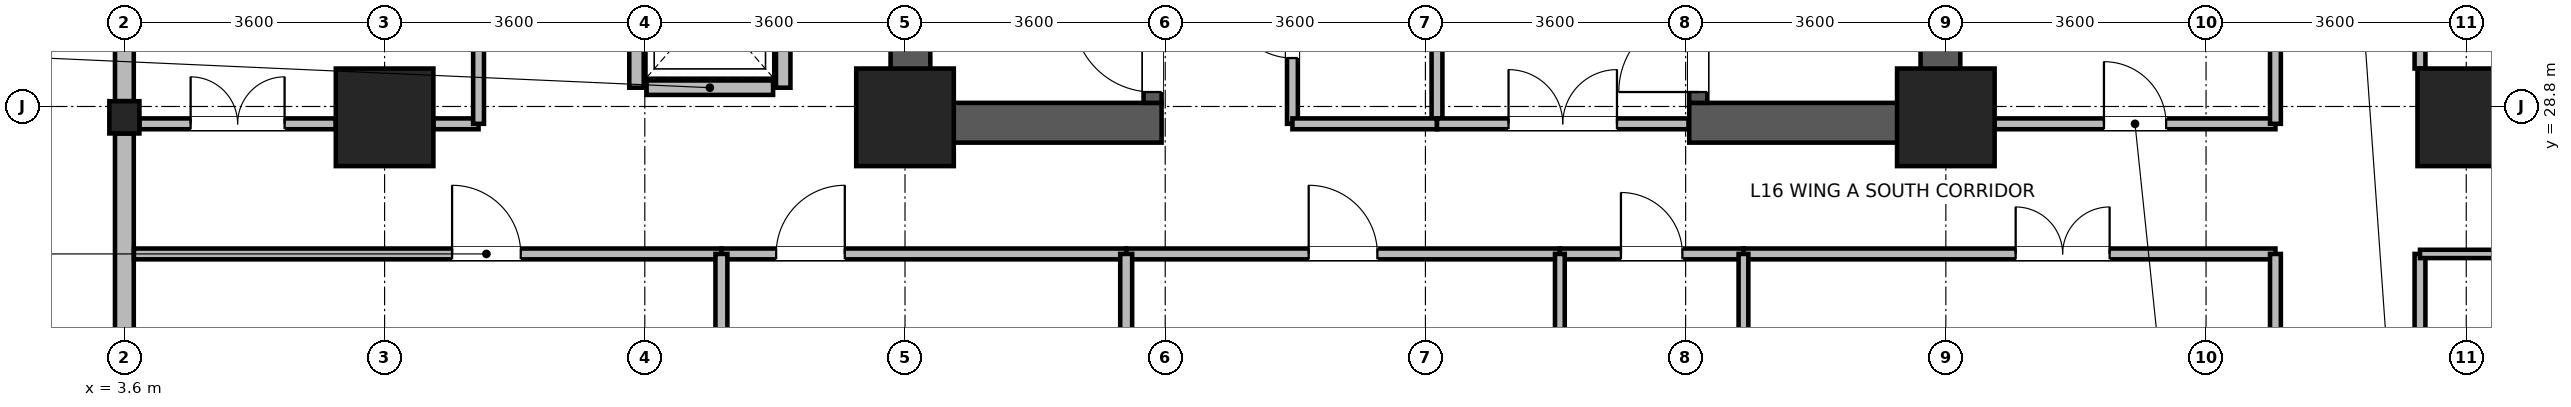
"""IFC4 building model, lengths in metres.
Left out: names, types, materials, properties, quantities, classifications, styles, units other than length and angle.
Written with IfcOpenShell. Run it as: python <this file> out.ifc"""

import sys

from ifc_helpers import new_model, si_unit, direction, frame, frame_2d, origin, origin_2d, place, context, subcontext, project, spatial, rectangle, i_section, extrude, source, transform, mapped, element, fill, save


model = new_model("IFC4")
c1 = context("Model", 3, precision=1e-05, world=origin(), true_north=direction((0.0, 1.0)))
c2 = subcontext(c1, "Body", "Model", "MODEL_VIEW")
j1 = project(units=[si_unit("LENGTHUNIT", "METRE"), si_unit("PLANEANGLEUNIT", "RADIAN")], contexts=[c1])
p1 = place(None, origin())
s1 = spatial("IfcSite", under=j1, at=p1, CompositionType="ELEMENT")
p2 = place(p1, origin())
s2 = spatial("IfcBuilding", under=s1, at=p2, CompositionType="ELEMENT")
p3 = place(p2, frame((0.0, 0.0, 66.0)))
s3 = spatial("IfcBuildingStorey", under=s2, at=p3, CompositionType="ELEMENT", Elevation=66.0)
for number, where, z_axis, x_axis in (
    (1, (14.475, 28.3, 0.0), (0.0, 0.0, 1.0), (0.0, 1.0, 0.0)),
    (2, (28.725, 28.3, 0.0), (0.0, 0.0, 1.0), (0.0, 1.0, 0.0)),
):
    element("IfcWall", number, at=place(p3, frame(where, z_axis=z_axis, x_axis=x_axis)), inside=s3, PredefinedType="SHEAR", context=c2, shape_type="SweptSolid", body=[
        extrude(rectangle(XDim=8.1, YDim=0.55, at=frame_2d((4.05, 0.0))), origin(), (0.0, 0.0, 1.0), 3.45),
    ])
for number, where, z_axis, x_axis in (
    (3, (14.75, 28.575, 0.0), (0.0, 0.0, 1.0), (1.0, 0.0, 0.0)),
    (4, (25.25, 28.575, 0.0), (0.0, 0.0, 1.0), (1.0, 0.0, 0.0)),
):
    element("IfcWall", number, at=place(p3, frame(where, z_axis=z_axis, x_axis=x_axis)), inside=s3, PredefinedType="SHEAR", context=c2, shape_type="SweptSolid", body=[
        extrude(rectangle(XDim=3.2, YDim=0.55, at=frame_2d((1.6, 0.0))), origin(), (0.0, 0.0, 1.0), 3.45),
    ])
p4 = place(p3, frame((17.825, 28.85, 0.0), z_axis=(0.0, 0.0, 1.0), x_axis=(0.0, 1.0, 0.0)))
e5 = element("IfcWall", 5, at=p4, inside=s3, PredefinedType="SHEAR", context=c2, shape_type="SweptSolid", body=[
    extrude(rectangle(XDim=7.0, YDim=0.25, at=frame_2d((3.5, 0.0))), origin(), (0.0, 0.0, 1.0), 3.45),
])
p5 = place(p4, frame((0.15, 0.0, 0.0)))
e6 = element("IfcOpeningElement", 6, at=p5, cuts=e5, PredefinedType="OPENING", context=c2, shape_type="SweptSolid", body=[
    extrude(rectangle(XDim=1.1, YDim=2.08, at=frame_2d((0.55, 1.04))), frame((0.0, 0.135, 0.0), z_axis=(0.0, -1.0, 0.0), x_axis=(1.0, 0.0, 0.0)), (0.0, 0.0, 1.0), 0.27),
])
p6 = place(p3, frame((25.375, 28.85, 0.0), z_axis=(0.0, 0.0, 1.0), x_axis=(0.0, 1.0, 0.0)))
e7 = element("IfcWall", 7, at=p6, inside=s3, PredefinedType="SHEAR", context=c2, shape_type="SweptSolid", body=[
    extrude(rectangle(XDim=7.0, YDim=0.25, at=frame_2d((3.5, 0.0))), origin(), (0.0, 0.0, 1.0), 3.45),
])
p7 = place(p6, frame((0.15, 0.0, 0.0)))
e8 = element("IfcOpeningElement", 8, at=p7, cuts=e7, PredefinedType="OPENING", context=c2, shape_type="SweptSolid", body=[
    extrude(rectangle(XDim=1.1, YDim=2.08, at=frame_2d((0.55, 1.04))), frame((0.0, 0.135, 0.0), z_axis=(0.0, -1.0, 0.0), x_axis=(1.0, 0.0, 0.0)), (0.0, 0.0, 1.0), 0.27),
])
m1 = source(origin(), c2, "Body", "SweptSolid", [
    extrude(rectangle(XDim=1.35, YDim=1.35, at=origin_2d()), origin(), (0.0, 0.0, 1.0), 3.7),
])
for number, where, z_axis, x_axis in (
    (9, (7.2, 28.65, 0.0), (0.0, 0.0, 1.0), (1.0, 0.0, 0.0)),
    (10, (14.4, 28.65, 0.0), (0.0, 0.0, 1.0), (1.0, 0.0, 0.0)),
    (11, (28.8, 28.65, 0.0), (0.0, 0.0, 1.0), (1.0, 0.0, 0.0)),
    (12, (36.0, 28.65, 0.0), (0.0, 0.0, 1.0), (1.0, 0.0, 0.0)),
):
    element("IfcColumn", number, at=place(p3, frame(where, z_axis=z_axis, x_axis=x_axis)), inside=s3, PredefinedType="COLUMN", context=c2, shape_type="MappedRepresentation", body=[
        mapped(m1, transform((0.0, 0.0, 0.0), x_axis=(1.0, 0.0, 0.0), y_axis=(0.0, 1.0, 0.0), z_axis=(0.0, 0.0, 1.0), scale=1.0)),
    ])
m2 = source(origin(), c2, "Body", "SweptSolid", [
    extrude(i_section(OverallWidth=0.416, OverallDepth=0.446, WebThickness=0.029, FlangeThickness=0.04, FilletRadius=0.015, at=origin_2d()), origin(), (0.0, 0.0, 1.0), 3.7),
])
p8 = place(p3, frame((3.6, 28.65, 0.0), z_axis=(0.0, 0.0, 1.0), x_axis=(1.0, 0.0, 0.0)))
e13 = element("IfcColumn", 13, at=p8, inside=s3, PredefinedType="COLUMN", context=c2, shape_type="MappedRepresentation", body=[
    mapped(m2, transform((0.0, 0.0, 0.0), x_axis=(1.0, 0.0, 0.0), y_axis=(0.0, 1.0, 0.0), z_axis=(0.0, 0.0, 1.0), scale=1.0)),
])
p9 = place(p3, frame((3.6, 28.874, 0.0), z_axis=(0.0, 0.0, 1.0), x_axis=(0.0, 1.0, 0.0)))
e14 = element("IfcWall", 14, at=p9, inside=s3, PredefinedType="STANDARD", context=c2, shape_type="SweptSolid", body=[
    extrude(rectangle(XDim=7.052, YDim=0.26, at=frame_2d((3.526, 0.0))), origin(), (0.0, 0.0, 1.0), 2.93),
])
p10 = place(p9, frame((1.013, 0.0, 0.85)))
e15 = element("IfcOpeningElement", 15, at=p10, cuts=e14, PredefinedType="OPENING", context=c2, shape_type="SweptSolid", body=[
    extrude(rectangle(XDim=1.5, YDim=1.85, at=frame_2d((0.75, 0.925))), frame((0.0, 0.14, 0.0), z_axis=(0.0, -1.0, 0.0), x_axis=(1.0, 0.0, 0.0)), (0.0, 0.0, 1.0), 0.28),
])
p11 = place(p9, frame((4.539, 0.0, 0.85)))
e16 = element("IfcOpeningElement", 16, at=p11, cuts=e14, PredefinedType="OPENING", context=c2, shape_type="SweptSolid", body=[
    extrude(rectangle(XDim=1.5, YDim=1.85, at=frame_2d((0.75, 0.925))), frame((0.0, 0.14, 0.0), z_axis=(0.0, -1.0, 0.0), x_axis=(1.0, 0.0, 0.0)), (0.0, 0.0, 1.0), 0.28),
])
p12 = place(p3, frame((3.6, 21.47, 0.0), z_axis=(0.0, 0.0, 1.0), x_axis=(0.0, 1.0, 0.0)))
e17 = element("IfcWall", 17, at=p12, inside=s3, PredefinedType="STANDARD", context=c2, shape_type="SweptSolid", body=[
    extrude(rectangle(XDim=6.956, YDim=0.26, at=frame_2d((3.478, 0.0))), origin(), (0.0, 0.0, 1.0), 3.43),
])
p13 = place(p12, frame((0.989, 0.0, 0.85)))
e18 = element("IfcOpeningElement", 18, at=p13, cuts=e17, PredefinedType="OPENING", context=c2, shape_type="SweptSolid", body=[
    extrude(rectangle(XDim=1.5, YDim=1.85, at=frame_2d((0.75, 0.925))), frame((0.0, 0.14, 0.0), z_axis=(0.0, -1.0, 0.0), x_axis=(1.0, 0.0, 0.0)), (0.0, 0.0, 1.0), 0.28),
])
p14 = place(p12, frame((3.003, 0.0, 0.85)))
e19 = element("IfcOpeningElement", 19, at=p14, cuts=e17, PredefinedType="OPENING", context=c2, shape_type="SweptSolid", body=[
    extrude(rectangle(XDim=0.95, YDim=1.75, at=frame_2d((0.475, 0.875))), frame((0.0, 0.14, 0.0), z_axis=(0.0, -1.0, 0.0), x_axis=(1.0, 0.0, 0.0)), (0.0, 0.0, 1.0), 0.28),
])
p15 = place(p3, frame((10.825, 29.06, 0.0), z_axis=(0.0, 0.0, 1.0), x_axis=(1.0, 0.0, 0.0)))
e20 = element("IfcWall", 20, at=p15, inside=s3, PredefinedType="PARTITIONING", context=c2, shape_type="SweptSolid", body=[
    extrude(rectangle(XDim=1.75, YDim=0.2, at=frame_2d((0.875, 0.0))), origin(), (0.0, 0.0, 1.0), 3.43),
])
for number, where, z_axis, x_axis in (
    (21, (10.685, 29.06, 0.0), (0.0, 0.0, 1.0), (0.0, 1.0, 0.0)),
    (22, (12.715, 29.06, 0.0), (0.0, 0.0, 1.0), (0.0, 1.0, 0.0)),
):
    element("IfcWall", number, at=place(p3, frame(where, z_axis=z_axis, x_axis=x_axis)), inside=s3, PredefinedType="PARTITIONING", context=c2, shape_type="SweptSolid", body=[
        extrude(rectangle(XDim=2.28, YDim=0.2, at=frame_2d((1.14, 0.0))), origin(), (0.0, 0.0, 1.0), 3.43),
    ])
p16 = place(p3, frame((35.36, 22.275, 0.0), z_axis=(0.0, 0.0, 1.0), x_axis=(0.0, 1.0, 0.0)))
e23 = element("IfcWall", 23, at=p16, inside=s3, PredefinedType="PARTITIONING", context=c2, shape_type="SweptSolid", body=[
    extrude(rectangle(XDim=4.485, YDim=0.15, at=frame_2d((2.243, 0.0))), origin(), (0.0, 0.0, 1.0), 3.43),
])
p17 = place(p3, frame((3.732, 26.76, 0.0), z_axis=(0.0, 0.0, 1.0), x_axis=(1.0, 0.0, 0.0)))
e24 = element("IfcWall", 24, at=p17, inside=s3, PredefinedType="PARTITIONING", context=c2, shape_type="SweptSolid", body=[
    extrude(rectangle(XDim=8.128, YDim=0.15, at=frame_2d((4.064, 0.0))), origin(), (0.0, 0.0, 1.0), 3.43),
])
p18 = place(p17, frame((4.402, 0.0, 0.0)))
e25 = element("IfcOpeningElement", 25, at=p18, cuts=e24, PredefinedType="OPENING", context=c2, shape_type="SweptSolid", body=[
    extrude(rectangle(XDim=0.95, YDim=2.1, at=frame_2d((0.475, 1.05))), frame((0.0, 0.085, 0.0), z_axis=(0.0, -1.0, 0.0), x_axis=(1.0, 0.0, 0.0)), (0.0, 0.0, 1.0), 0.17),
])
p19 = place(p3, frame((35.36, 29.325, 0.0), z_axis=(0.0, 0.0, 1.0), x_axis=(0.0, 1.0, 0.0)))
e26 = element("IfcWall", 26, at=p19, inside=s3, PredefinedType="PARTITIONING", context=c2, shape_type="SweptSolid", body=[
    extrude(rectangle(XDim=6.15, YDim=0.15, at=frame_2d((3.075, 0.0))), origin(), (0.0, 0.0, 1.0), 3.43),
])
p20 = place(p19, frame((2.425, 0.0, 0.0)))
e27 = element("IfcOpeningElement", 27, at=p20, cuts=e26, PredefinedType="OPENING", context=c2, shape_type="SweptSolid", body=[
    extrude(rectangle(XDim=1.3, YDim=2.12, at=frame_2d((0.65, 1.06))), frame((0.0, 0.085, 0.0), z_axis=(0.0, -1.0, 0.0), x_axis=(1.0, 0.0, 0.0)), (0.0, 0.0, 1.0), 0.17),
])
p21 = place(p3, frame((26.0, 26.76, 0.0), z_axis=(0.0, 0.0, 1.0), x_axis=(1.0, 0.0, 0.0)))
e28 = element("IfcWall", 28, at=p21, inside=s3, PredefinedType="PARTITIONING", context=c2, shape_type="SweptSolid", body=[
    extrude(rectangle(XDim=7.36, YDim=0.15, at=frame_2d((3.68, 0.0))), origin(), (0.0, 0.0, 1.0), 3.43),
])
p22 = place(p21, frame((3.766, 0.0, 0.0)))
e29 = element("IfcOpeningElement", 29, at=p22, cuts=e28, PredefinedType="OPENING", context=c2, shape_type="SweptSolid", body=[
    extrude(rectangle(XDim=1.3, YDim=2.12, at=frame_2d((0.65, 1.06))), frame((0.0, 0.085, 0.0), z_axis=(0.0, -1.0, 0.0), x_axis=(1.0, 0.0, 0.0)), (0.0, 0.0, 1.0), 0.17),
])
p23 = place(p3, frame((17.46, 26.76, 0.0), z_axis=(0.0, 0.0, 1.0), x_axis=(1.0, 0.0, 0.0)))
e30 = element("IfcWall", 30, at=p23, inside=s3, PredefinedType="PARTITIONING", context=c2, shape_type="SweptSolid", body=[
    extrude(rectangle(XDim=6.0, YDim=0.15, at=frame_2d((3.0, 0.0))), origin(), (0.0, 0.0, 1.0), 3.43),
])
p24 = place(p23, frame((2.525, 0.0, 0.0)))
e31 = element("IfcOpeningElement", 31, at=p24, cuts=e30, PredefinedType="OPENING", context=c2, shape_type="SweptSolid", body=[
    extrude(rectangle(XDim=0.95, YDim=2.1, at=frame_2d((0.475, 1.05))), frame((0.0, 0.085, 0.0), z_axis=(0.0, -1.0, 0.0), x_axis=(1.0, 0.0, 0.0)), (0.0, 0.0, 1.0), 0.17),
])
p25 = place(p3, frame((11.86, 26.76, 0.0), z_axis=(0.0, 0.0, 1.0), x_axis=(1.0, 0.0, 0.0)))
e32 = element("IfcWall", 32, at=p25, inside=s3, PredefinedType="PARTITIONING", context=c2, shape_type="SweptSolid", body=[
    extrude(rectangle(XDim=5.6, YDim=0.15, at=frame_2d((2.8, 0.0))), origin(), (0.0, 0.0, 1.0), 3.43),
])
p26 = place(p25, frame((0.757, 0.0, 0.0)))
e33 = element("IfcOpeningElement", 33, at=p26, cuts=e32, PredefinedType="OPENING", context=c2, shape_type="SweptSolid", body=[
    extrude(rectangle(XDim=0.95, YDim=2.1, at=frame_2d((0.475, 1.05))), frame((0.0, 0.085, 0.0), z_axis=(0.0, -1.0, 0.0), x_axis=(1.0, 0.0, 0.0)), (0.0, 0.0, 1.0), 0.17),
])
p27 = place(p3, frame((33.36, 21.6, 0.0), z_axis=(0.0, 0.0, 1.0), x_axis=(0.0, 1.0, 0.0)))
e34 = element("IfcWall", 34, at=p27, inside=s3, PredefinedType="PARTITIONING", context=c2, shape_type="SweptSolid", body=[
    extrude(rectangle(XDim=5.16, YDim=0.15, at=frame_2d((2.58, 0.0))), origin(), (0.0, 0.0, 1.0), 3.43),
])
p28 = place(p3, frame((3.808, 28.56, 0.0), z_axis=(0.0, 0.0, 1.0), x_axis=(1.0, 0.0, 0.0)))
e35 = element("IfcWall", 35, at=p28, inside=s3, PredefinedType="PARTITIONING", context=c2, shape_type="SweptSolid", body=[
    extrude(rectangle(XDim=2.717, YDim=0.15, at=frame_2d((1.358, 0.0))), origin(), (0.0, 0.0, 1.0), 2.78),
])
p29 = place(p28, frame((0.708, 0.0, 0.0)))
e36 = element("IfcOpeningElement", 36, at=p29, cuts=e35, PredefinedType="OPENING", context=c2, shape_type="SweptSolid", body=[
    extrude(rectangle(XDim=1.3, YDim=2.12, at=frame_2d((0.65, 1.06))), frame((0.0, 0.085, 0.0), z_axis=(0.0, -1.0, 0.0), x_axis=(1.0, 0.0, 0.0)), (0.0, 0.0, 1.0), 0.17),
])
p30 = place(p3, frame((7.875, 28.56, 0.0), z_axis=(0.0, 0.0, 1.0), x_axis=(1.0, 0.0, 0.0)))
e37 = element("IfcWall", 37, at=p30, inside=s3, PredefinedType="PARTITIONING", context=c2, shape_type="SweptSolid", body=[
    extrude(rectangle(XDim=0.625, YDim=0.15, at=frame_2d((0.312, 0.0))), origin(), (0.0, 0.0, 1.0), 2.78),
])
p31 = place(p3, frame((29.475, 28.56, 0.0), z_axis=(0.0, 0.0, 1.0), x_axis=(1.0, 0.0, 0.0)))
e38 = element("IfcWall", 38, at=p31, inside=s3, PredefinedType="PARTITIONING", context=c2, shape_type="SweptSolid", body=[
    extrude(rectangle(XDim=3.885, YDim=0.15, at=frame_2d((1.942, 0.0))), origin(), (0.0, 0.0, 1.0), 2.78),
])
p32 = place(p31, frame((1.512, 0.0, 0.0)))
e39 = element("IfcOpeningElement", 39, at=p32, cuts=e38, PredefinedType="OPENING", context=c2, shape_type="SweptSolid", body=[
    extrude(rectangle(XDim=0.86, YDim=2.02, at=frame_2d((0.43, 1.01))), frame((0.0, 0.085, 0.0), z_axis=(0.0, -1.0, 0.0), x_axis=(1.0, 0.0, 0.0)), (0.0, 0.0, 1.0), 0.17),
])
p33 = place(p3, frame((8.5, 28.56, 0.0), z_axis=(0.0, 0.0, 1.0), x_axis=(0.0, 1.0, 0.0)))
e40 = element("IfcWall", 40, at=p33, inside=s3, PredefinedType="PARTITIONING", context=c2, shape_type="SweptSolid", body=[
    extrude(rectangle(XDim=3.84, YDim=0.15, at=frame_2d((1.92, 0.0))), origin(), (0.0, 0.0, 1.0), 3.43),
])
p34 = place(p3, frame((33.36, 28.56, 0.0), z_axis=(0.0, 0.0, 1.0), x_axis=(0.0, 1.0, 0.0)))
e41 = element("IfcWall", 41, at=p34, inside=s3, PredefinedType="PARTITIONING", context=c2, shape_type="SweptSolid", body=[
    extrude(rectangle(XDim=3.08, YDim=0.15, at=frame_2d((1.54, 0.0))), origin(), (0.0, 0.0, 1.0), 3.43),
])
p35 = place(p3, frame((19.76, 28.56, 0.0), z_axis=(0.0, 0.0, 1.0), x_axis=(0.0, 1.0, 0.0)))
e42 = element("IfcWall", 42, at=p35, inside=s3, PredefinedType="PARTITIONING", context=c2, shape_type="SweptSolid", body=[
    extrude(rectangle(XDim=2.68, YDim=0.15, at=frame_2d((1.34, 0.0))), origin(), (0.0, 0.0, 1.0), 3.43),
])
p36 = place(p35, frame((0.91, 0.0, 0.0)))
e43 = element("IfcOpeningElement", 43, at=p36, cuts=e42, PredefinedType="OPENING", context=c2, shape_type="SweptSolid", body=[
    extrude(rectangle(XDim=0.86, YDim=2.02, at=frame_2d((0.43, 1.01))), frame((0.0, 0.085, 0.0), z_axis=(0.0, -1.0, 0.0), x_axis=(1.0, 0.0, 0.0)), (0.0, 0.0, 1.0), 0.17),
])
p37 = place(p3, frame((21.76, 28.56, 0.0), z_axis=(0.0, 0.0, 1.0), x_axis=(0.0, 1.0, 0.0)))
e44 = element("IfcWall", 44, at=p37, inside=s3, PredefinedType="PARTITIONING", context=c2, shape_type="SweptSolid", body=[
    extrude(rectangle(XDim=2.68, YDim=0.15, at=frame_2d((1.34, 0.0))), origin(), (0.0, 0.0, 1.0), 3.43),
])
p38 = place(p3, frame((23.46, 26.76, 0.0), z_axis=(0.0, 0.0, 1.0), x_axis=(1.0, 0.0, 0.0)))
e45 = element("IfcWall", 45, at=p38, inside=s3, PredefinedType="PARTITIONING", context=c2, shape_type="SweptSolid", body=[
    extrude(rectangle(XDim=2.54, YDim=0.15, at=frame_2d((1.27, 0.0))), origin(), (0.0, 0.0, 1.0), 3.43),
])
p39 = place(p38, frame((0.845, 0.0, 0.0)))
e46 = element("IfcOpeningElement", 46, at=p39, cuts=e45, PredefinedType="OPENING", context=c2, shape_type="SweptSolid", body=[
    extrude(rectangle(XDim=0.85, YDim=2.04, at=frame_2d((0.425, 1.02))), frame((0.0, 0.085, 0.0), z_axis=(0.0, -1.0, 0.0), x_axis=(1.0, 0.0, 0.0)), (0.0, 0.0, 1.0), 0.17),
])
p40 = place(p3, frame((19.76, 28.56, 0.0), z_axis=(0.0, 0.0, 1.0), x_axis=(1.0, 0.0, 0.0)))
e47 = element("IfcWall", 47, at=p40, inside=s3, PredefinedType="PARTITIONING", context=c2, shape_type="SweptSolid", body=[
    extrude(rectangle(XDim=2.0, YDim=0.15, at=frame_2d((1.0, 0.0))), origin(), (0.0, 0.0, 1.0), 2.23),
])
p41 = place(p3, frame((35.36, 26.76, 0.0), z_axis=(0.0, 0.0, 1.0), x_axis=(1.0, 0.0, 0.0)))
e48 = element("IfcWall", 48, at=p41, inside=s3, PredefinedType="PARTITIONING", context=c2, shape_type="SweptSolid", body=[
    extrude(rectangle(XDim=6.04, YDim=0.115, at=frame_2d((3.02, 0.0))), origin(), (0.0, 0.0, 1.0), 3.43),
])
p42 = place(p3, frame((17.46, 21.732, 0.0), z_axis=(0.0, 0.0, 1.0), x_axis=(0.0, 1.0, 0.0)))
e49 = element("IfcWall", 49, at=p42, inside=s3, PredefinedType="PARTITIONING", context=c2, shape_type="SweptSolid", body=[
    extrude(rectangle(XDim=5.028, YDim=0.165, at=frame_2d((2.514, 0.0))), origin(), (0.0, 0.0, 1.0), 3.43),
])
for number, where, z_axis, x_axis in (
    (50, (23.46, 21.732, 0.0), (0.0, 0.0, 1.0), (0.0, 1.0, 0.0)),
    (51, (26.0, 21.732, 0.0), (0.0, 0.0, 1.0), (0.0, 1.0, 0.0)),
):
    element("IfcWall", number, at=place(p3, frame(where, z_axis=z_axis, x_axis=x_axis)), inside=s3, PredefinedType="PARTITIONING", context=c2, shape_type="SweptSolid", body=[
        extrude(rectangle(XDim=5.028, YDim=0.135, at=frame_2d((2.514, 0.0))), origin(), (0.0, 0.0, 1.0), 3.43),
    ])
p43 = place(p3, frame((21.76, 28.56, 0.0), z_axis=(0.0, 0.0, 1.0), x_axis=(1.0, 0.0, 0.0)))
e52 = element("IfcWall", 52, at=p43, inside=s3, PredefinedType="PARTITIONING", context=c2, shape_type="SweptSolid", body=[
    extrude(rectangle(XDim=3.48, YDim=0.15, at=frame_2d((1.74, 0.0))), origin(), (0.0, 0.0, 1.0), 2.23),
])
p44 = place(p43, frame((0.99, 0.0, 0.0)))
e53 = element("IfcOpeningElement", 53, at=p44, cuts=e52, PredefinedType="OPENING", context=c2, shape_type="SweptSolid", body=[
    extrude(rectangle(XDim=1.5, YDim=2.1, at=frame_2d((0.75, 1.05))), frame((0.0, 0.085, 0.0), z_axis=(0.0, -1.0, 0.0), x_axis=(1.0, 0.0, 0.0)), (0.0, 0.0, 1.0), 0.17),
])
p45 = place(p3, frame((11.86, 23.5, 0.0), z_axis=(0.0, 0.0, 1.0), x_axis=(0.0, 1.0, 0.0)))
e54 = element("IfcWall", 54, at=p45, inside=s3, PredefinedType="PARTITIONING", context=c2, shape_type="SweptSolid", body=[
    extrude(rectangle(XDim=3.26, YDim=0.165, at=frame_2d((1.63, 0.0))), origin(), (0.0, 0.0, 1.0), 3.43),
])
p46 = place(p5, origin())
e55 = element("IfcDoor", 55, at=p46, inside=s3, OperationType="SINGLE_SWING_RIGHT", PredefinedType="DOOR", context=c2, shape_type="SweptSolid", body=[
    extrude(rectangle(XDim=1.1, YDim=2.08, at=frame_2d((0.55, 1.04))), frame((0.0, 0.025, 0.0), z_axis=(0.0, -1.0, 0.0), x_axis=(1.0, 0.0, 0.0)), (0.0, 0.0, 1.0), 0.05),
])
fill(e6, e55)
p47 = place(p7, origin())
e56 = element("IfcDoor", 56, at=p47, inside=s3, OperationType="SINGLE_SWING_LEFT", PredefinedType="DOOR", context=c2, shape_type="SweptSolid", body=[
    extrude(rectangle(XDim=1.1, YDim=2.08, at=frame_2d((0.55, 1.04))), frame((0.0, 0.025, 0.0), z_axis=(0.0, -1.0, 0.0), x_axis=(1.0, 0.0, 0.0)), (0.0, 0.0, 1.0), 0.05),
])
fill(e8, e56)
p48 = place(p18, origin())
e57 = element("IfcDoor", 57, at=p48, inside=s3, OperationType="SINGLE_SWING_LEFT", PredefinedType="DOOR", context=c2, shape_type="SweptSolid", body=[
    extrude(rectangle(XDim=0.95, YDim=2.1, at=frame_2d((0.475, 1.05))), frame((0.0, 0.025, 0.0), z_axis=(0.0, -1.0, 0.0), x_axis=(1.0, 0.0, 0.0)), (0.0, 0.0, 1.0), 0.05),
])
fill(e25, e57)
p49 = place(p22, origin())
e58 = element("IfcDoor", 58, at=p49, inside=s3, OperationType="DOUBLE_DOOR_SINGLE_SWING", PredefinedType="DOOR", context=c2, shape_type="SweptSolid", body=[
    extrude(rectangle(XDim=1.3, YDim=2.12, at=frame_2d((0.65, 1.06))), frame((0.0, 0.025, 0.0), z_axis=(0.0, -1.0, 0.0), x_axis=(1.0, 0.0, 0.0)), (0.0, 0.0, 1.0), 0.05),
])
fill(e29, e58)
p50 = place(p24, origin())
e59 = element("IfcDoor", 59, at=p50, inside=s3, OperationType="SINGLE_SWING_LEFT", PredefinedType="DOOR", context=c2, shape_type="SweptSolid", body=[
    extrude(rectangle(XDim=0.95, YDim=2.1, at=frame_2d((0.475, 1.05))), frame((0.0, 0.025, 0.0), z_axis=(0.0, -1.0, 0.0), x_axis=(1.0, 0.0, 0.0)), (0.0, 0.0, 1.0), 0.05),
])
fill(e31, e59)
p51 = place(p26, origin())
e60 = element("IfcDoor", 60, at=p51, inside=s3, OperationType="SINGLE_SWING_RIGHT", PredefinedType="DOOR", context=c2, shape_type="SweptSolid", body=[
    extrude(rectangle(XDim=0.95, YDim=2.1, at=frame_2d((0.475, 1.05))), frame((0.0, 0.025, 0.0), z_axis=(0.0, -1.0, 0.0), x_axis=(1.0, 0.0, 0.0)), (0.0, 0.0, 1.0), 0.05),
])
fill(e33, e60)
p52 = place(p29, origin())
e61 = element("IfcDoor", 61, at=p52, inside=s3, OperationType="DOUBLE_DOOR_SINGLE_SWING", PredefinedType="DOOR", context=c2, shape_type="SweptSolid", body=[
    extrude(rectangle(XDim=1.3, YDim=2.12, at=frame_2d((0.65, 1.06))), frame((0.0, 0.025, 0.0), z_axis=(0.0, -1.0, 0.0), x_axis=(1.0, 0.0, 0.0)), (0.0, 0.0, 1.0), 0.05),
])
fill(e36, e61)
p53 = place(p32, origin())
e62 = element("IfcDoor", 62, at=p53, inside=s3, OperationType="SINGLE_SWING_LEFT", PredefinedType="DOOR", context=c2, shape_type="SweptSolid", body=[
    extrude(rectangle(XDim=0.86, YDim=2.02, at=frame_2d((0.43, 1.01))), frame((0.0, 0.025, 0.0), z_axis=(0.0, -1.0, 0.0), x_axis=(1.0, 0.0, 0.0)), (0.0, 0.0, 1.0), 0.05),
])
fill(e39, e62)
p54 = place(p36, origin())
e63 = element("IfcDoor", 63, at=p54, inside=s3, OperationType="SINGLE_SWING_RIGHT", PredefinedType="DOOR", context=c2, shape_type="SweptSolid", body=[
    extrude(rectangle(XDim=0.86, YDim=2.02, at=frame_2d((0.43, 1.01))), frame((0.0, 0.025, 0.0), z_axis=(0.0, -1.0, 0.0), x_axis=(1.0, 0.0, 0.0)), (0.0, 0.0, 1.0), 0.05),
])
fill(e43, e63)
p55 = place(p39, origin())
e64 = element("IfcDoor", 64, at=p55, inside=s3, OperationType="SINGLE_SWING_LEFT", PredefinedType="DOOR", context=c2, shape_type="SweptSolid", body=[
    extrude(rectangle(XDim=0.85, YDim=2.04, at=frame_2d((0.425, 1.02))), frame((0.0, 0.025, 0.0), z_axis=(0.0, -1.0, 0.0), x_axis=(1.0, 0.0, 0.0)), (0.0, 0.0, 1.0), 0.05),
])
fill(e46, e64)
p56 = place(p44, origin())
e65 = element("IfcDoor", 65, at=p56, inside=s3, OperationType="DOUBLE_DOOR_SINGLE_SWING", PredefinedType="DOOR", context=c2, shape_type="SweptSolid", body=[
    extrude(rectangle(XDim=1.5, YDim=2.1, at=frame_2d((0.75, 1.05))), frame((0.0, 0.025, 0.0), z_axis=(0.0, -1.0, 0.0), x_axis=(1.0, 0.0, 0.0)), (0.0, 0.0, 1.0), 0.05),
])
fill(e53, e65)
save(model, sys.argv[1])
